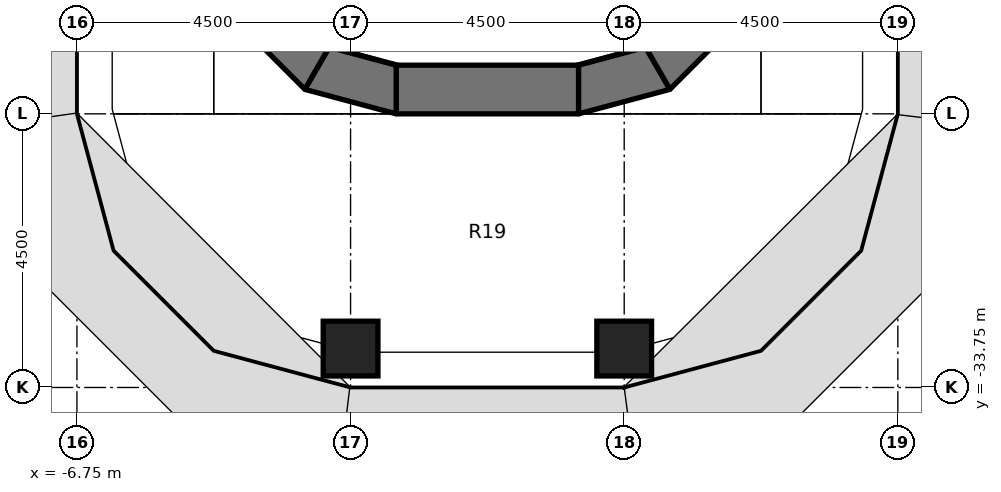
"""IFC4 building model, lengths in metres.
Left out: names, types, materials, properties, quantities, classifications, styles, units other than length and angle.
Written with IfcOpenShell. Run it as: python <this file> out.ifc"""

import sys

from ifc_helpers import new_model, si_unit, direction, frame, frame_2d, origin, origin_2d, place, context, subcontext, project, spatial, polyline, rectangle, outline, extrude, element, save


model = new_model("IFC4")
c1 = context("Model", 3, precision=1e-05, world=origin(), true_north=direction((0.0, 1.0)))
c2 = subcontext(c1, "Body", "Model", "MODEL_VIEW")
j1 = project(units=[si_unit("LENGTHUNIT", "METRE"), si_unit("PLANEANGLEUNIT", "RADIAN")], contexts=[c1])
p1 = place(None, origin())
s1 = spatial("IfcSite", under=j1, at=p1, CompositionType="ELEMENT")
p2 = place(p1, origin())
s2 = spatial("IfcBuilding", under=s1, at=p2, CompositionType="ELEMENT")
p3 = place(p2, frame((0.0, 0.0, 109.4)))
s3 = spatial("IfcBuildingStorey", under=s2, at=p3, CompositionType="ELEMENT", Elevation=109.4)
for number, where, z_axis, x_axis in (
    (1, (-2.25, -33.11, 0.0), (0.0, 0.0, 1.0), (1.0, 0.0, 0.0)),
    (2, (2.25, -33.11, 0.0), (0.0, 0.0, 1.0), (1.0, 0.0, 0.0)),
):
    element("IfcColumn", number, at=place(p3, frame(where, z_axis=z_axis, x_axis=x_axis)), inside=s3, PredefinedType="COLUMN", context=c2, shape_type="SweptSolid", body=[
        extrude(rectangle(XDim=0.9, YDim=0.9, at=origin_2d()), origin(), (0.0, 0.0, 1.0), 3.65),
    ])
p4 = place(p3, frame((-1.5, -28.85, 0.0), z_axis=(0.0, 0.0, 1.0), x_axis=(1.0, 0.0, 0.0)))
e3 = element("IfcWall", 3, at=p4, inside=s3, PredefinedType="SHEAR", context=c2, shape_type="SweptSolid", body=[
    extrude(rectangle(XDim=3.0, YDim=0.8, at=frame_2d((1.5, 0.0))), origin(), (0.0, 0.0, 1.0), 3.8),
])
p5 = place(p3, origin())
e4 = element("IfcWall", 4, at=p5, inside=s3, PredefinedType="SHEAR", context=c2, shape_type="SweptSolid", body=[
    extrude(outline(polyline([(-4.098, -27.75), (-3.0, -28.848), (-2.6, -28.155), (-3.405, -27.35), (-4.098, -27.75)])), origin(), (0.0, 0.0, 1.0), 3.8),
])
p6 = place(p3, origin())
e5 = element("IfcWall", 5, at=p6, inside=s3, PredefinedType="SHEAR", context=c2, shape_type="SweptSolid", body=[
    extrude(outline(polyline([(-3.0, -28.848), (-1.5, -29.25), (-1.5, -28.45), (-2.6, -28.155), (-3.0, -28.848)])), origin(), (0.0, 0.0, 1.0), 3.8),
])
p7 = place(p3, origin())
e6 = element("IfcWall", 6, at=p7, inside=s3, PredefinedType="SHEAR", context=c2, shape_type="SweptSolid", body=[
    extrude(outline(polyline([(4.098, -27.75), (3.0, -28.848), (2.6, -28.155), (3.405, -27.35), (4.098, -27.75)])), origin(), (0.0, 0.0, 1.0), 3.8),
])
p8 = place(p3, origin())
e7 = element("IfcWall", 7, at=p8, inside=s3, PredefinedType="SHEAR", context=c2, shape_type="SweptSolid", body=[
    extrude(outline(polyline([(3.0, -28.848), (1.5, -29.25), (1.5, -28.45), (2.6, -28.155), (3.0, -28.848)])), origin(), (0.0, 0.0, 1.0), 3.8),
])
save(model, sys.argv[1])
